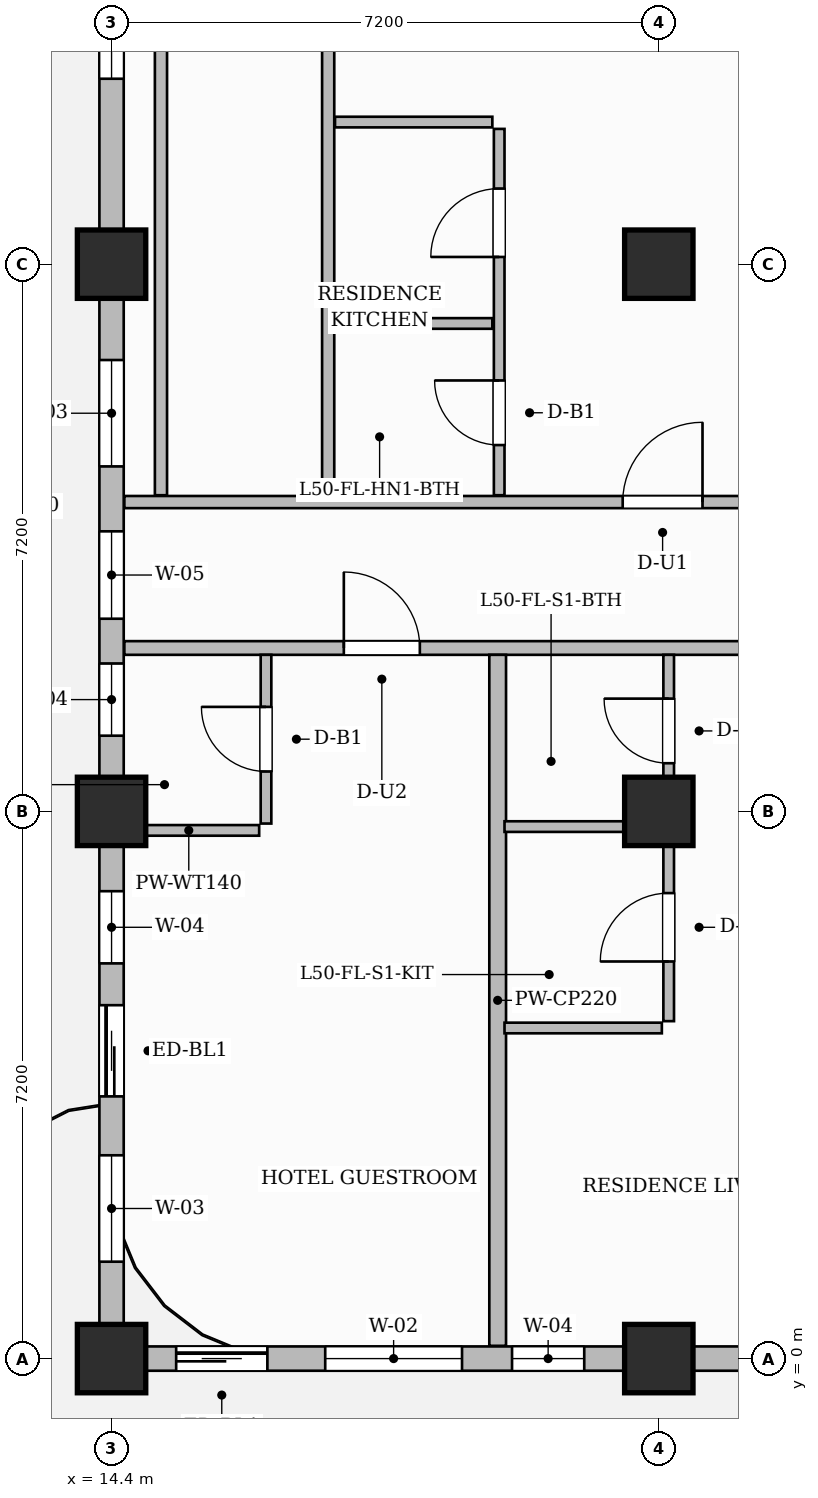
"""IFC4 building model, lengths in metres.
Left out: names, types, materials, properties, quantities, classifications, styles, units other than length and angle.
Written with IfcOpenShell. Run it as: python <this file> out.ifc"""

import sys

from ifc_helpers import new_model, si_unit, direction, frame, frame_2d, origin, origin_2d, place, context, subcontext, project, spatial, rectangle, extrude, source, transform, mapped, element, fill, save


model = new_model("IFC4")
c1 = context("Model", 3, precision=1e-05, world=origin(), true_north=direction((0.0, 1.0)))
c2 = subcontext(c1, "Body", "Model", "MODEL_VIEW")
j1 = project(units=[si_unit("LENGTHUNIT", "METRE"), si_unit("PLANEANGLEUNIT", "RADIAN")], contexts=[c1])
p1 = place(None, origin())
s1 = spatial("IfcSite", under=j1, at=p1, CompositionType="ELEMENT")
p2 = place(p1, origin())
s2 = spatial("IfcBuilding", under=s1, at=p2, CompositionType="ELEMENT")
p3 = place(p2, frame((0.0, 0.0, 201.9)))
s3 = spatial("IfcBuildingStorey", under=s2, at=p3, CompositionType="ELEMENT", Elevation=201.9)
m1 = source(origin(), c2, "Body", "SweptSolid", [
    extrude(rectangle(XDim=0.9, YDim=0.9, at=origin_2d()), origin(), (0.0, 0.0, 1.0), 3.85),
])
for number, where, z_axis, x_axis in (
    (1, (14.4, 0.0, 0.0), (0.0, 0.0, 1.0), (1.0, 0.0, 0.0)),
    (2, (14.4, 7.2, 0.0), (0.0, 0.0, 1.0), (1.0, 0.0, 0.0)),
    (3, (14.4, 14.4, 0.0), (0.0, 0.0, 1.0), (1.0, 0.0, 0.0)),
    (4, (21.6, 0.0, 0.0), (0.0, 0.0, 1.0), (1.0, 0.0, 0.0)),
    (5, (21.6, 7.2, 0.0), (0.0, 0.0, 1.0), (1.0, 0.0, 0.0)),
    (6, (21.6, 14.4, 0.0), (0.0, 0.0, 1.0), (1.0, 0.0, 0.0)),
):
    element("IfcColumn", number, at=place(p3, frame(where, z_axis=z_axis, x_axis=x_axis)), inside=s3, PredefinedType="COLUMN", context=c2, shape_type="MappedRepresentation", body=[
        mapped(m1, transform((0.0, 0.0, 0.0), scale=1.0)),
    ])
p4 = place(p3, frame((14.568, 9.35, 0.0), z_axis=(0.0, 0.0, 1.0), x_axis=(1.0, 0.0, 0.0)))
e7 = element("IfcWall", 7, at=p4, inside=s3, PredefinedType="PARTITIONING", context=c2, shape_type="SweptSolid", body=[
    extrude(rectangle(XDim=15.542, YDim=0.18, at=frame_2d((7.771, 0.0))), origin(), (0.0, 0.0, 1.0), 3.6),
])
p5 = place(p4, frame((2.888, 0.0, 0.0)))
e8 = element("IfcOpeningElement", 8, at=p5, cuts=e7, PredefinedType="OPENING", context=c2, shape_type="SweptSolid", body=[
    extrude(rectangle(XDim=1.0, YDim=2.2, at=frame_2d((0.5, 1.1))), frame((0.0, 0.1, 0.0), z_axis=(0.0, -1.0, 0.0), x_axis=(1.0, 0.0, 0.0)), (0.0, 0.0, 1.0), 0.2),
])
p6 = place(p4, frame((8.212, 0.0, 0.0)))
e9 = element("IfcOpeningElement", 9, at=p6, cuts=e7, PredefinedType="OPENING", context=c2, shape_type="SweptSolid", body=[
    extrude(rectangle(XDim=1.05, YDim=2.25, at=frame_2d((0.525, 1.125))), frame((0.0, 0.1, 0.0), z_axis=(0.0, -1.0, 0.0), x_axis=(1.0, 0.0, 0.0)), (0.0, 0.0, 1.0), 0.2),
])
p7 = place(p3, frame((14.568, 11.27, 0.0), z_axis=(0.0, 0.0, 1.0), x_axis=(1.0, 0.0, 0.0)))
e10 = element("IfcWall", 10, at=p7, inside=s3, PredefinedType="PARTITIONING", context=c2, shape_type="SweptSolid", body=[
    extrude(rectangle(XDim=15.542, YDim=0.16, at=frame_2d((7.771, 0.0))), origin(), (0.0, 0.0, 1.0), 3.6),
])
p8 = place(p7, frame((6.557, 0.0, 0.0)))
e11 = element("IfcOpeningElement", 11, at=p8, cuts=e10, PredefinedType="OPENING", context=c2, shape_type="SweptSolid", body=[
    extrude(rectangle(XDim=1.05, YDim=2.25, at=frame_2d((0.525, 1.125))), frame((0.0, 0.09, 0.0), z_axis=(0.0, -1.0, 0.0), x_axis=(1.0, 0.0, 0.0)), (0.0, 0.0, 1.0), 0.18),
])
p9 = place(p3, frame((19.48, 0.168, 0.0), z_axis=(0.0, 0.0, 1.0), x_axis=(0.0, 1.0, 0.0)))
e12 = element("IfcWall", 12, at=p9, inside=s3, PredefinedType="PARTITIONING", context=c2, shape_type="SweptSolid", body=[
    extrude(rectangle(XDim=9.092, YDim=0.22, at=frame_2d((4.546, 0.0))), origin(), (0.0, 0.0, 1.0), 3.6),
])
p10 = place(p3, frame((16.432, 7.04, 0.0), z_axis=(0.0, 0.0, 1.0), x_axis=(0.0, 1.0, 0.0)))
e13 = element("IfcWall", 13, at=p10, inside=s3, PredefinedType="PARTITIONING", context=c2, shape_type="SweptSolid", body=[
    extrude(rectangle(XDim=2.22, YDim=0.14, at=frame_2d((1.11, 0.0))), origin(), (0.0, 0.0, 1.0), 3.6),
])
p11 = place(p10, frame((0.685, 0.0, 0.0)))
e14 = element("IfcOpeningElement", 14, at=p11, cuts=e13, PredefinedType="OPENING", context=c2, shape_type="SweptSolid", body=[
    extrude(rectangle(XDim=0.85, YDim=2.1, at=frame_2d((0.425, 1.05))), frame((0.0, 0.08, 0.0), z_axis=(0.0, -1.0, 0.0), x_axis=(1.0, 0.0, 0.0)), (0.0, 0.0, 1.0), 0.16),
])
p12 = place(p3, frame((14.49, 6.95, 0.0), z_axis=(0.0, 0.0, 1.0), x_axis=(1.0, 0.0, 0.0)))
e15 = element("IfcWall", 15, at=p12, inside=s3, PredefinedType="PARTITIONING", context=c2, shape_type="SweptSolid", body=[
    extrude(rectangle(XDim=1.852, YDim=0.14, at=frame_2d((0.926, 0.0))), origin(), (0.0, 0.0, 1.0), 3.085),
])
p13 = place(p3, frame((21.73, 4.44, 0.0), z_axis=(0.0, 0.0, 1.0), x_axis=(0.0, 1.0, 0.0)))
e16 = element("IfcWall", 16, at=p13, inside=s3, PredefinedType="PARTITIONING", context=c2, shape_type="SweptSolid", body=[
    extrude(rectangle(XDim=4.82, YDim=0.14, at=frame_2d((2.41, 0.0))), origin(), (0.0, 0.0, 1.0), 3.085),
])
p14 = place(p13, frame((0.785, 0.0, 0.0)))
e17 = element("IfcOpeningElement", 17, at=p14, cuts=e16, PredefinedType="OPENING", context=c2, shape_type="SweptSolid", body=[
    extrude(rectangle(XDim=0.9, YDim=2.15, at=frame_2d((0.45, 1.075))), frame((0.0, 0.08, 0.0), z_axis=(0.0, -1.0, 0.0), x_axis=(1.0, 0.0, 0.0)), (0.0, 0.0, 1.0), 0.16),
])
p15 = place(p13, frame((3.394, 0.0, 0.0)))
e18 = element("IfcOpeningElement", 18, at=p15, cuts=e16, PredefinedType="OPENING", context=c2, shape_type="SweptSolid", body=[
    extrude(rectangle(XDim=0.85, YDim=2.1, at=frame_2d((0.425, 1.05))), frame((0.0, 0.08, 0.0), z_axis=(0.0, -1.0, 0.0), x_axis=(1.0, 0.0, 0.0)), (0.0, 0.0, 1.0), 0.16),
])
p16 = place(p3, frame((19.57, 7.0, 0.0), z_axis=(0.0, 0.0, 1.0), x_axis=(1.0, 0.0, 0.0)))
e19 = element("IfcWall", 19, at=p16, inside=s3, PredefinedType="PARTITIONING", context=c2, shape_type="SweptSolid", body=[
    extrude(rectangle(XDim=2.07, YDim=0.14, at=frame_2d((1.035, 0.0))), origin(), (0.0, 0.0, 1.0), 3.085),
])
p17 = place(p3, frame((19.57, 4.35, 0.0), z_axis=(0.0, 0.0, 1.0), x_axis=(1.0, 0.0, 0.0)))
e20 = element("IfcWall", 20, at=p17, inside=s3, PredefinedType="PARTITIONING", context=c2, shape_type="SweptSolid", body=[
    extrude(rectangle(XDim=2.07, YDim=0.14, at=frame_2d((1.035, 0.0))), origin(), (0.0, 0.0, 1.0), 3.6),
])
for number, where, z_axis, x_axis in (
    (21, (15.05, 11.36, 0.0), (0.0, 0.0, 1.0), (0.0, 1.0, 0.0)),
    (22, (17.25, 11.36, 0.0), (0.0, 0.0, 1.0), (0.0, 1.0, 0.0)),
):
    element("IfcWall", number, at=place(p3, frame(where, z_axis=z_axis, x_axis=x_axis)), inside=s3, PredefinedType="PARTITIONING", context=c2, shape_type="SweptSolid", body=[
        extrude(rectangle(XDim=13.75, YDim=0.16, at=frame_2d((6.875, 0.0))), origin(), (0.0, 0.0, 1.0), 3.6),
    ])
p18 = place(p3, frame((19.5, 11.36, 0.0), z_axis=(0.0, 0.0, 1.0), x_axis=(0.0, 1.0, 0.0)))
e23 = element("IfcWall", 23, at=p18, inside=s3, PredefinedType="PARTITIONING", context=c2, shape_type="SweptSolid", body=[
    extrude(rectangle(XDim=4.82, YDim=0.14, at=frame_2d((2.41, 0.0))), origin(), (0.0, 0.0, 1.0), 3.6),
])
p19 = place(p18, frame((0.66, 0.0, 0.0)))
e24 = element("IfcOpeningElement", 24, at=p19, cuts=e23, PredefinedType="OPENING", context=c2, shape_type="SweptSolid", body=[
    extrude(rectangle(XDim=0.85, YDim=2.1, at=frame_2d((0.425, 1.05))), frame((0.0, 0.08, 0.0), z_axis=(0.0, -1.0, 0.0), x_axis=(1.0, 0.0, 0.0)), (0.0, 0.0, 1.0), 0.16),
])
p20 = place(p18, frame((3.135, 0.0, 0.0)))
e25 = element("IfcOpeningElement", 25, at=p20, cuts=e23, PredefinedType="OPENING", context=c2, shape_type="SweptSolid", body=[
    extrude(rectangle(XDim=0.9, YDim=2.15, at=frame_2d((0.45, 1.075))), frame((0.0, 0.08, 0.0), z_axis=(0.0, -1.0, 0.0), x_axis=(1.0, 0.0, 0.0)), (0.0, 0.0, 1.0), 0.16),
])
for number, where, z_axis, x_axis in (
    (26, (17.34, 13.62, 0.0), (0.0, 0.0, 1.0), (1.0, 0.0, 0.0)),
    (27, (17.34, 16.27, 0.0), (0.0, 0.0, 1.0), (1.0, 0.0, 0.0)),
):
    element("IfcWall", number, at=place(p3, frame(where, z_axis=z_axis, x_axis=x_axis)), inside=s3, PredefinedType="PARTITIONING", context=c2, shape_type="SweptSolid", body=[
        extrude(rectangle(XDim=2.07, YDim=0.14, at=frame_2d((1.035, 0.0))), origin(), (0.0, 0.0, 1.0), 3.6),
    ])
p21 = place(p3, frame((14.4, 0.0, 0.0), z_axis=(0.0, 0.0, 1.0), x_axis=(1.0, 0.0, 0.0)))
e28 = element("IfcWall", 28, at=p21, inside=s3, PredefinedType="SOLIDWALL", context=c2, shape_type="SweptSolid", body=[
    extrude(rectangle(XDim=35.4, YDim=0.32, at=frame_2d((17.7, 0.0))), origin(), (0.0, 0.0, 1.0), 3.085),
])
p22 = place(p21, frame((0.85, 0.0, 0.0)))
e29 = element("IfcOpeningElement", 29, at=p22, cuts=e28, PredefinedType="OPENING", context=c2, shape_type="SweptSolid", body=[
    extrude(rectangle(XDim=1.2, YDim=2.2, at=frame_2d((0.6, 1.1))), frame((0.0, 0.17, 0.0), z_axis=(0.0, -1.0, 0.0), x_axis=(1.0, 0.0, 0.0)), (0.0, 0.0, 1.0), 0.34),
])
p23 = place(p21, frame((2.811, 0.0, 0.8)))
e30 = element("IfcOpeningElement", 30, at=p23, cuts=e28, PredefinedType="OPENING", context=c2, shape_type="SweptSolid", body=[
    extrude(rectangle(XDim=1.8, YDim=1.85, at=frame_2d((0.9, 0.925))), frame((0.0, 0.17, 0.0), z_axis=(0.0, -1.0, 0.0), x_axis=(1.0, 0.0, 0.0)), (0.0, 0.0, 1.0), 0.34),
])
p24 = place(p21, frame((5.269, 0.0, 0.8)))
e31 = element("IfcOpeningElement", 31, at=p24, cuts=e28, PredefinedType="OPENING", context=c2, shape_type="SweptSolid", body=[
    extrude(rectangle(XDim=0.95, YDim=1.75, at=frame_2d((0.475, 0.875))), frame((0.0, 0.17, 0.0), z_axis=(0.0, -1.0, 0.0), x_axis=(1.0, 0.0, 0.0)), (0.0, 0.0, 1.0), 0.34),
])
p25 = place(p21, frame((8.496, 0.0, 0.8)))
e32 = element("IfcOpeningElement", 32, at=p25, cuts=e28, PredefinedType="OPENING", context=c2, shape_type="SweptSolid", body=[
    extrude(rectangle(XDim=1.4, YDim=1.85, at=frame_2d((0.7, 0.925))), frame((0.0, 0.17, 0.0), z_axis=(0.0, -1.0, 0.0), x_axis=(1.0, 0.0, 0.0)), (0.0, 0.0, 1.0), 0.34),
])
p26 = place(p21, frame((11.104, 0.0, 0.8)))
e33 = element("IfcOpeningElement", 33, at=p26, cuts=e28, PredefinedType="OPENING", context=c2, shape_type="SweptSolid", body=[
    extrude(rectangle(XDim=1.8, YDim=1.85, at=frame_2d((0.9, 0.925))), frame((0.0, 0.17, 0.0), z_axis=(0.0, -1.0, 0.0), x_axis=(1.0, 0.0, 0.0)), (0.0, 0.0, 1.0), 0.34),
])
p27 = place(p21, frame((16.804, 0.0, 0.8)))
e34 = element("IfcOpeningElement", 34, at=p27, cuts=e28, PredefinedType="OPENING", context=c2, shape_type="SweptSolid", body=[
    extrude(rectangle(XDim=1.8, YDim=1.85, at=frame_2d((0.9, 0.925))), frame((0.0, 0.17, 0.0), z_axis=(0.0, -1.0, 0.0), x_axis=(1.0, 0.0, 0.0)), (0.0, 0.0, 1.0), 0.34),
])
p28 = place(p21, frame((22.396, 0.0, 0.8)))
e35 = element("IfcOpeningElement", 35, at=p28, cuts=e28, PredefinedType="OPENING", context=c2, shape_type="SweptSolid", body=[
    extrude(rectangle(XDim=1.8, YDim=1.85, at=frame_2d((0.9, 0.925))), frame((0.0, 0.17, 0.0), z_axis=(0.0, -1.0, 0.0), x_axis=(1.0, 0.0, 0.0)), (0.0, 0.0, 1.0), 0.34),
])
p29 = place(p21, frame((25.629, 0.0, 0.8)))
e36 = element("IfcOpeningElement", 36, at=p29, cuts=e28, PredefinedType="OPENING", context=c2, shape_type="SweptSolid", body=[
    extrude(rectangle(XDim=0.95, YDim=1.75, at=frame_2d((0.475, 0.875))), frame((0.0, 0.17, 0.0), z_axis=(0.0, -1.0, 0.0), x_axis=(1.0, 0.0, 0.0)), (0.0, 0.0, 1.0), 0.34),
])
p30 = place(p21, frame((29.075, 0.0, 0.8)))
e37 = element("IfcOpeningElement", 37, at=p30, cuts=e28, PredefinedType="OPENING", context=c2, shape_type="SweptSolid", body=[
    extrude(rectangle(XDim=1.8, YDim=1.85, at=frame_2d((0.9, 0.925))), frame((0.0, 0.17, 0.0), z_axis=(0.0, -1.0, 0.0), x_axis=(1.0, 0.0, 0.0)), (0.0, 0.0, 1.0), 0.34),
])
p31 = place(p21, frame((32.125, 0.0, 0.8)))
e38 = element("IfcOpeningElement", 38, at=p31, cuts=e28, PredefinedType="OPENING", context=c2, shape_type="SweptSolid", body=[
    extrude(rectangle(XDim=1.8, YDim=1.85, at=frame_2d((0.9, 0.925))), frame((0.0, 0.17, 0.0), z_axis=(0.0, -1.0, 0.0), x_axis=(1.0, 0.0, 0.0)), (0.0, 0.0, 1.0), 0.34),
])
p32 = place(p3, frame((14.4, 0.05, 0.0), z_axis=(0.0, 0.0, 1.0), x_axis=(0.0, 1.0, 0.0)))
e39 = element("IfcWall", 39, at=p32, inside=s3, PredefinedType="SOLIDWALL", context=c2, shape_type="SweptSolid", body=[
    extrude(rectangle(XDim=20.6, YDim=0.32, at=frame_2d((10.3, 0.0))), origin(), (0.0, 0.0, 1.0), 3.085),
])
p33 = place(p32, frame((3.4, 0.0, 0.0)))
e40 = element("IfcOpeningElement", 40, at=p33, cuts=e39, PredefinedType="OPENING", context=c2, shape_type="SweptSolid", body=[
    extrude(rectangle(XDim=1.2, YDim=2.2, at=frame_2d((0.6, 1.1))), frame((0.0, 0.17, 0.0), z_axis=(0.0, -1.0, 0.0), x_axis=(1.0, 0.0, 0.0)), (0.0, 0.0, 1.0), 0.34),
])
p34 = place(p32, frame((1.225, 0.0, 0.8)))
e41 = element("IfcOpeningElement", 41, at=p34, cuts=e39, PredefinedType="OPENING", context=c2, shape_type="SweptSolid", body=[
    extrude(rectangle(XDim=1.4, YDim=1.85, at=frame_2d((0.7, 0.925))), frame((0.0, 0.17, 0.0), z_axis=(0.0, -1.0, 0.0), x_axis=(1.0, 0.0, 0.0)), (0.0, 0.0, 1.0), 0.34),
])
p35 = place(p32, frame((5.15, 0.0, 0.8)))
e42 = element("IfcOpeningElement", 42, at=p35, cuts=e39, PredefinedType="OPENING", context=c2, shape_type="SweptSolid", body=[
    extrude(rectangle(XDim=0.95, YDim=1.75, at=frame_2d((0.475, 0.875))), frame((0.0, 0.17, 0.0), z_axis=(0.0, -1.0, 0.0), x_axis=(1.0, 0.0, 0.0)), (0.0, 0.0, 1.0), 0.34),
])
p36 = place(p32, frame((8.146, 0.0, 0.8)))
e43 = element("IfcOpeningElement", 43, at=p36, cuts=e39, PredefinedType="OPENING", context=c2, shape_type="SweptSolid", body=[
    extrude(rectangle(XDim=0.95, YDim=1.75, at=frame_2d((0.475, 0.875))), frame((0.0, 0.17, 0.0), z_axis=(0.0, -1.0, 0.0), x_axis=(1.0, 0.0, 0.0)), (0.0, 0.0, 1.0), 0.34),
])
p37 = place(p32, frame((9.685, 0.0, 0.8)))
e44 = element("IfcOpeningElement", 44, at=p37, cuts=e39, PredefinedType="OPENING", context=c2, shape_type="SweptSolid", body=[
    extrude(rectangle(XDim=1.15, YDim=1.8, at=frame_2d((0.575, 0.9))), frame((0.0, 0.17, 0.0), z_axis=(0.0, -1.0, 0.0), x_axis=(1.0, 0.0, 0.0)), (0.0, 0.0, 1.0), 0.34),
])
p38 = place(p32, frame((11.689, 0.0, 0.8)))
e45 = element("IfcOpeningElement", 45, at=p38, cuts=e39, PredefinedType="OPENING", context=c2, shape_type="SweptSolid", body=[
    extrude(rectangle(XDim=1.4, YDim=1.85, at=frame_2d((0.7, 0.925))), frame((0.0, 0.17, 0.0), z_axis=(0.0, -1.0, 0.0), x_axis=(1.0, 0.0, 0.0)), (0.0, 0.0, 1.0), 0.34),
])
p39 = place(p32, frame((16.79, 0.0, 0.8)))
e46 = element("IfcOpeningElement", 46, at=p39, cuts=e39, PredefinedType="OPENING", context=c2, shape_type="SweptSolid", body=[
    extrude(rectangle(XDim=1.8, YDim=1.85, at=frame_2d((0.9, 0.925))), frame((0.0, 0.17, 0.0), z_axis=(0.0, -1.0, 0.0), x_axis=(1.0, 0.0, 0.0)), (0.0, 0.0, 1.0), 0.34),
])
m2 = source(origin(), c2, "Body", "SweptSolid", [
    extrude(rectangle(XDim=0.85, YDim=2.1, at=frame_2d((0.425, 1.05))), frame((0.0, 0.025, 0.0), z_axis=(0.0, -1.0, 0.0), x_axis=(1.0, 0.0, 0.0)), (0.0, 0.0, 1.0), 0.05),
])
p40 = place(p11, origin())
e47 = element("IfcDoor", 47, at=p40, inside=s3, OperationType="SINGLE_SWING_RIGHT", PredefinedType="DOOR", context=c2, shape_type="MappedRepresentation", body=[
    mapped(m2, transform((0.0, 0.0, 0.0), scale=1.0)),
])
fill(e14, e47)
m3 = source(origin(), c2, "Body", "SweptSolid", [
    extrude(rectangle(XDim=1.0, YDim=2.2, at=frame_2d((0.5, 1.1))), frame((0.0, 0.025, 0.0), z_axis=(0.0, -1.0, 0.0), x_axis=(1.0, 0.0, 0.0)), (0.0, 0.0, 1.0), 0.05),
])
p41 = place(p5, origin())
e48 = element("IfcDoor", 48, at=p41, inside=s3, OperationType="SINGLE_SWING_LEFT", PredefinedType="DOOR", context=c2, shape_type="MappedRepresentation", body=[
    mapped(m3, transform((0.0, 0.0, 0.0), scale=1.0)),
])
fill(e8, e48)
m4 = source(origin(), c2, "Body", "SweptSolid", [
    extrude(rectangle(XDim=0.9, YDim=2.15, at=frame_2d((0.45, 1.075))), frame((0.0, 0.025, 0.0), z_axis=(0.0, -1.0, 0.0), x_axis=(1.0, 0.0, 0.0)), (0.0, 0.0, 1.0), 0.05),
])
p42 = place(p14, origin())
e49 = element("IfcDoor", 49, at=p42, inside=s3, OperationType="SINGLE_SWING_LEFT", PredefinedType="DOOR", context=c2, shape_type="MappedRepresentation", body=[
    mapped(m4, transform((0.0, 0.0, 0.0), scale=1.0)),
])
fill(e17, e49)
p43 = place(p15, origin())
e50 = element("IfcDoor", 50, at=p43, inside=s3, OperationType="SINGLE_SWING_RIGHT", PredefinedType="DOOR", context=c2, shape_type="MappedRepresentation", body=[
    mapped(m2, transform((0.0, 0.0, 0.0), scale=1.0)),
])
fill(e18, e50)
p44 = place(p19, origin())
e51 = element("IfcDoor", 51, at=p44, inside=s3, OperationType="SINGLE_SWING_RIGHT", PredefinedType="DOOR", context=c2, shape_type="MappedRepresentation", body=[
    mapped(m2, transform((0.0, 0.0, 0.0), scale=1.0)),
])
fill(e24, e51)
p45 = place(p20, origin())
e52 = element("IfcDoor", 52, at=p45, inside=s3, OperationType="SINGLE_SWING_LEFT", PredefinedType="DOOR", context=c2, shape_type="MappedRepresentation", body=[
    mapped(m4, transform((0.0, 0.0, 0.0), scale=1.0)),
])
fill(e25, e52)
m5 = source(origin(), c2, "Body", "SweptSolid", [
    extrude(rectangle(XDim=1.05, YDim=2.25, at=frame_2d((0.525, 1.125))), frame((0.0, 0.025, 0.0), z_axis=(0.0, -1.0, 0.0), x_axis=(1.0, 0.0, 0.0)), (0.0, 0.0, 1.0), 0.05),
])
p46 = place(p8, origin())
e53 = element("IfcDoor", 53, at=p46, inside=s3, OperationType="SINGLE_SWING_RIGHT", PredefinedType="DOOR", context=c2, shape_type="MappedRepresentation", body=[
    mapped(m5, transform((0.0, 0.0, 0.0), scale=1.0)),
])
fill(e11, e53)
m6 = source(origin(), c2, "Body", "SweptSolid", [
    extrude(rectangle(XDim=1.2, YDim=2.2, at=frame_2d((0.6, 1.1))), frame((0.0, 0.025, 0.0), z_axis=(0.0, -1.0, 0.0), x_axis=(1.0, 0.0, 0.0)), (0.0, 0.0, 1.0), 0.05),
])
p47 = place(p22, origin())
e54 = element("IfcDoor", 54, at=p47, inside=s3, OperationType="SLIDING_TO_LEFT", PredefinedType="DOOR", context=c2, shape_type="MappedRepresentation", body=[
    mapped(m6, transform((0.0, 0.0, 0.0), scale=1.0)),
])
fill(e29, e54)
p48 = place(p33, origin())
e55 = element("IfcDoor", 55, at=p48, inside=s3, OperationType="SLIDING_TO_LEFT", PredefinedType="DOOR", context=c2, shape_type="MappedRepresentation", body=[
    mapped(m6, transform((0.0, 0.0, 0.0), scale=1.0)),
])
fill(e40, e55)
m7 = source(origin(), c2, "Body", "SweptSolid", [
    extrude(rectangle(XDim=1.8, YDim=1.85, at=frame_2d((0.9, 0.925))), frame((0.0, 0.03, 0.0), z_axis=(0.0, -1.0, 0.0), x_axis=(1.0, 0.0, 0.0)), (0.0, 0.0, 1.0), 0.06),
])
p49 = place(p23, origin())
e56 = element("IfcWindow", 56, at=p49, inside=s3, PartitioningType="DOUBLE_PANEL_VERTICAL", PredefinedType="WINDOW", context=c2, shape_type="MappedRepresentation", body=[
    mapped(m7, transform((0.0, 0.0, 0.0), scale=1.0)),
])
fill(e30, e56)
m8 = source(origin(), c2, "Body", "SweptSolid", [
    extrude(rectangle(XDim=0.95, YDim=1.75, at=frame_2d((0.475, 0.875))), frame((0.0, 0.03, 0.0), z_axis=(0.0, -1.0, 0.0), x_axis=(1.0, 0.0, 0.0)), (0.0, 0.0, 1.0), 0.06),
])
p50 = place(p24, origin())
e57 = element("IfcWindow", 57, at=p50, inside=s3, PartitioningType="SINGLE_PANEL", PredefinedType="WINDOW", context=c2, shape_type="MappedRepresentation", body=[
    mapped(m8, transform((0.0, 0.0, 0.0), scale=1.0)),
])
fill(e31, e57)
m9 = source(origin(), c2, "Body", "SweptSolid", [
    extrude(rectangle(XDim=1.4, YDim=1.85, at=frame_2d((0.7, 0.925))), frame((0.0, 0.03, 0.0), z_axis=(0.0, -1.0, 0.0), x_axis=(1.0, 0.0, 0.0)), (0.0, 0.0, 1.0), 0.06),
])
p51 = place(p34, origin())
e58 = element("IfcWindow", 58, at=p51, inside=s3, PartitioningType="SINGLE_PANEL", PredefinedType="WINDOW", context=c2, shape_type="MappedRepresentation", body=[
    mapped(m9, transform((0.0, 0.0, 0.0), scale=1.0)),
])
fill(e41, e58)
p52 = place(p35, origin())
e59 = element("IfcWindow", 59, at=p52, inside=s3, PartitioningType="SINGLE_PANEL", PredefinedType="WINDOW", context=c2, shape_type="MappedRepresentation", body=[
    mapped(m8, transform((0.0, 0.0, 0.0), scale=1.0)),
])
fill(e42, e59)
p53 = place(p36, origin())
e60 = element("IfcWindow", 60, at=p53, inside=s3, PartitioningType="SINGLE_PANEL", PredefinedType="WINDOW", context=c2, shape_type="MappedRepresentation", body=[
    mapped(m8, transform((0.0, 0.0, 0.0), scale=1.0)),
])
fill(e43, e60)
m10 = source(origin(), c2, "Body", "SweptSolid", [
    extrude(rectangle(XDim=1.15, YDim=1.8, at=frame_2d((0.575, 0.9))), frame((0.0, 0.03, 0.0), z_axis=(0.0, -1.0, 0.0), x_axis=(1.0, 0.0, 0.0)), (0.0, 0.0, 1.0), 0.06),
])
p54 = place(p37, origin())
e61 = element("IfcWindow", 61, at=p54, inside=s3, PartitioningType="SINGLE_PANEL", PredefinedType="WINDOW", context=c2, shape_type="MappedRepresentation", body=[
    mapped(m10, transform((0.0, 0.0, 0.0), scale=1.0)),
])
fill(e44, e61)
p55 = place(p38, origin())
e62 = element("IfcWindow", 62, at=p55, inside=s3, PartitioningType="SINGLE_PANEL", PredefinedType="WINDOW", context=c2, shape_type="MappedRepresentation", body=[
    mapped(m9, transform((0.0, 0.0, 0.0), scale=1.0)),
])
fill(e45, e62)
p56 = place(p39, origin())
e63 = element("IfcWindow", 63, at=p56, inside=s3, PartitioningType="DOUBLE_PANEL_VERTICAL", PredefinedType="WINDOW", context=c2, shape_type="MappedRepresentation", body=[
    mapped(m7, transform((0.0, 0.0, 0.0), scale=1.0)),
])
fill(e46, e63)
save(model, sys.argv[1])
